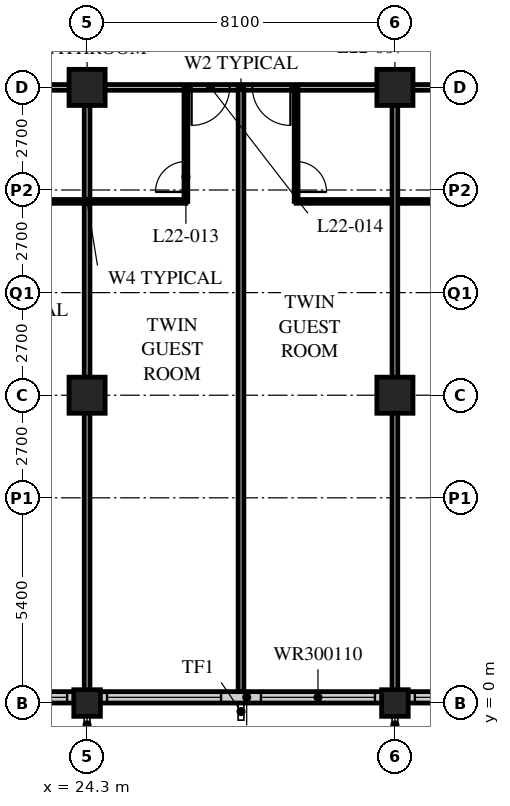
"""IFC4 building model, lengths in metres.
Left out: names, types, materials, properties, quantities, classifications, styles, units other than length and angle.
Written with IfcOpenShell. Run it as: python <this file> out.ifc"""

import sys

from ifc_helpers import new_model, si_unit, direction, frame, frame_2d, origin, origin_2d, place, context, subcontext, project, spatial, rectangle, hollow_rectangle, extrude, element, fill, save


model = new_model("IFC4")
c1 = context("Model", 3, precision=1e-05, world=origin(), true_north=direction((0.0, 1.0)))
c2 = subcontext(c1, "Body", "Model", "MODEL_VIEW")
j1 = project(units=[si_unit("LENGTHUNIT", "METRE"), si_unit("PLANEANGLEUNIT", "RADIAN")], contexts=[c1])
p1 = place(None, origin())
s1 = spatial("IfcSite", under=j1, at=p1, CompositionType="ELEMENT")
p2 = place(p1, origin())
s2 = spatial("IfcBuilding", under=s1, at=p2, CompositionType="ELEMENT")
p3 = place(p2, frame((0.0, 0.0, 87.4)))
s3 = spatial("IfcBuildingStorey", under=s2, at=p3, CompositionType="ELEMENT", Elevation=87.4)
p4 = place(p3, frame((24.3, 0.0, 0.0), z_axis=(0.0, 0.0, 1.0), x_axis=(1.0, 0.0, 0.0)))
e1 = element("IfcColumn", 1, at=p4, inside=s3, PredefinedType="COLUMN", context=c2, shape_type="SweptSolid", body=[
    extrude(hollow_rectangle(XDim=0.7, YDim=0.7, WallThickness=0.06, at=origin_2d()), origin(), (0.0, 0.0, 1.0), 3.4),
])
for number, where, z_axis, x_axis in (
    (2, (24.3, 8.1, 0.0), (0.0, 0.0, 1.0), (1.0, 0.0, 0.0)),
    (3, (24.3, 16.2, 0.0), (0.0, 0.0, 1.0), (1.0, 0.0, 0.0)),
):
    element("IfcColumn", number, at=place(p3, frame(where, z_axis=z_axis, x_axis=x_axis)), inside=s3, PredefinedType="COLUMN", context=c2, shape_type="SweptSolid", body=[
        extrude(hollow_rectangle(XDim=0.95, YDim=0.95, WallThickness=0.095, at=origin_2d()), origin(), (0.0, 0.0, 1.0), 3.4),
    ])
p5 = place(p3, frame((32.4, 0.0, 0.0), z_axis=(0.0, 0.0, 1.0), x_axis=(1.0, 0.0, 0.0)))
e4 = element("IfcColumn", 4, at=p5, inside=s3, PredefinedType="COLUMN", context=c2, shape_type="SweptSolid", body=[
    extrude(hollow_rectangle(XDim=0.7, YDim=0.7, WallThickness=0.06, at=origin_2d()), origin(), (0.0, 0.0, 1.0), 3.4),
])
for number, where, z_axis, x_axis in (
    (5, (32.4, 8.1, 0.0), (0.0, 0.0, 1.0), (1.0, 0.0, 0.0)),
    (6, (32.4, 16.2, 0.0), (0.0, 0.0, 1.0), (1.0, 0.0, 0.0)),
):
    element("IfcColumn", number, at=place(p3, frame(where, z_axis=z_axis, x_axis=x_axis)), inside=s3, PredefinedType="COLUMN", context=c2, shape_type="SweptSolid", body=[
        extrude(hollow_rectangle(XDim=0.95, YDim=0.95, WallThickness=0.095, at=origin_2d()), origin(), (0.0, 0.0, 1.0), 3.4),
    ])
p6 = place(p3, frame((8.4, 0.15, 0.0), z_axis=(0.0, 0.0, 1.0), x_axis=(1.0, 0.0, 0.0)))
e7 = element("IfcWall", 7, at=p6, inside=s3, PredefinedType="SOLIDWALL", context=c2, shape_type="SweptSolid", body=[
    extrude(rectangle(XDim=40.2, YDim=0.3, at=frame_2d((20.1, 0.0))), origin(), (0.0, 0.0, 1.0), 2.05),
])
p7 = place(p6, frame((0.225, 0.0, 0.9)))
e8 = element("IfcOpeningElement", 8, at=p7, cuts=e7, PredefinedType="OPENING", context=c2, shape_type="SweptSolid", body=[
    extrude(rectangle(XDim=3.0, YDim=1.1, at=frame_2d((1.5, 0.55))), frame((0.0, 0.16, 0.0), z_axis=(0.0, -1.0, 0.0), x_axis=(1.0, 0.0, 0.0)), (0.0, 0.0, 1.0), 0.32),
])
p8 = place(p6, frame((4.275, 0.0, 0.9)))
e9 = element("IfcOpeningElement", 9, at=p8, cuts=e7, PredefinedType="OPENING", context=c2, shape_type="SweptSolid", body=[
    extrude(rectangle(XDim=3.0, YDim=1.1, at=frame_2d((1.5, 0.55))), frame((0.0, 0.16, 0.0), z_axis=(0.0, -1.0, 0.0), x_axis=(1.0, 0.0, 0.0)), (0.0, 0.0, 1.0), 0.32),
])
p9 = place(p6, frame((8.325, 0.0, 0.9)))
e10 = element("IfcOpeningElement", 10, at=p9, cuts=e7, PredefinedType="OPENING", context=c2, shape_type="SweptSolid", body=[
    extrude(rectangle(XDim=3.0, YDim=1.1, at=frame_2d((1.5, 0.55))), frame((0.0, 0.16, 0.0), z_axis=(0.0, -1.0, 0.0), x_axis=(1.0, 0.0, 0.0)), (0.0, 0.0, 1.0), 0.32),
])
p10 = place(p6, frame((12.375, 0.0, 0.9)))
e11 = element("IfcOpeningElement", 11, at=p10, cuts=e7, PredefinedType="OPENING", context=c2, shape_type="SweptSolid", body=[
    extrude(rectangle(XDim=3.0, YDim=1.1, at=frame_2d((1.5, 0.55))), frame((0.0, 0.16, 0.0), z_axis=(0.0, -1.0, 0.0), x_axis=(1.0, 0.0, 0.0)), (0.0, 0.0, 1.0), 0.32),
])
p11 = place(p6, frame((16.425, 0.0, 0.9)))
e12 = element("IfcOpeningElement", 12, at=p11, cuts=e7, PredefinedType="OPENING", context=c2, shape_type="SweptSolid", body=[
    extrude(rectangle(XDim=3.0, YDim=1.1, at=frame_2d((1.5, 0.55))), frame((0.0, 0.16, 0.0), z_axis=(0.0, -1.0, 0.0), x_axis=(1.0, 0.0, 0.0)), (0.0, 0.0, 1.0), 0.32),
])
p12 = place(p6, frame((20.475, 0.0, 0.9)))
e13 = element("IfcOpeningElement", 13, at=p12, cuts=e7, PredefinedType="OPENING", context=c2, shape_type="SweptSolid", body=[
    extrude(rectangle(XDim=3.0, YDim=1.1, at=frame_2d((1.5, 0.55))), frame((0.0, 0.16, 0.0), z_axis=(0.0, -1.0, 0.0), x_axis=(1.0, 0.0, 0.0)), (0.0, 0.0, 1.0), 0.32),
])
p13 = place(p6, frame((24.525, 0.0, 0.9)))
e14 = element("IfcOpeningElement", 14, at=p13, cuts=e7, PredefinedType="OPENING", context=c2, shape_type="SweptSolid", body=[
    extrude(rectangle(XDim=3.0, YDim=1.1, at=frame_2d((1.5, 0.55))), frame((0.0, 0.16, 0.0), z_axis=(0.0, -1.0, 0.0), x_axis=(1.0, 0.0, 0.0)), (0.0, 0.0, 1.0), 0.32),
])
p14 = place(p6, frame((28.575, 0.0, 0.9)))
e15 = element("IfcOpeningElement", 15, at=p14, cuts=e7, PredefinedType="OPENING", context=c2, shape_type="SweptSolid", body=[
    extrude(rectangle(XDim=3.0, YDim=1.1, at=frame_2d((1.5, 0.55))), frame((0.0, 0.16, 0.0), z_axis=(0.0, -1.0, 0.0), x_axis=(1.0, 0.0, 0.0)), (0.0, 0.0, 1.0), 0.32),
])
p15 = place(p6, frame((32.625, 0.0, 0.9)))
e16 = element("IfcOpeningElement", 16, at=p15, cuts=e7, PredefinedType="OPENING", context=c2, shape_type="SweptSolid", body=[
    extrude(rectangle(XDim=3.0, YDim=1.1, at=frame_2d((1.5, 0.55))), frame((0.0, 0.16, 0.0), z_axis=(0.0, -1.0, 0.0), x_axis=(1.0, 0.0, 0.0)), (0.0, 0.0, 1.0), 0.32),
])
p16 = place(p6, frame((36.675, 0.0, 0.9)))
e17 = element("IfcOpeningElement", 17, at=p16, cuts=e7, PredefinedType="OPENING", context=c2, shape_type="SweptSolid", body=[
    extrude(rectangle(XDim=3.0, YDim=1.1, at=frame_2d((1.5, 0.55))), frame((0.0, 0.16, 0.0), z_axis=(0.0, -1.0, 0.0), x_axis=(1.0, 0.0, 0.0)), (0.0, 0.0, 1.0), 0.32),
])
p17 = place(p3, frame((12.15, 16.2, 0.0), z_axis=(0.0, 0.0, 1.0), x_axis=(1.0, 0.0, 0.0)))
e18 = element("IfcWall", 18, at=p17, inside=s3, PredefinedType="PARTITIONING", context=c2, shape_type="SweptSolid", body=[
    extrude(rectangle(XDim=32.4, YDim=0.15, at=frame_2d((16.2, 0.0))), origin(), (0.0, 0.0, 1.0), 2.388),
])
p18 = place(p17, frame((6.5, 0.0, 0.0)))
e19 = element("IfcOpeningElement", 19, at=p18, cuts=e18, PredefinedType="OPENING", context=c2, shape_type="SweptSolid", body=[
    extrude(rectangle(XDim=1.0, YDim=2.1, at=frame_2d((0.5, 1.05))), frame((0.0, 0.085, 0.0), z_axis=(0.0, -1.0, 0.0), x_axis=(1.0, 0.0, 0.0)), (0.0, 0.0, 1.0), 0.17),
])
p19 = place(p17, frame((8.4, 0.0, 0.0)))
e20 = element("IfcOpeningElement", 20, at=p19, cuts=e18, PredefinedType="OPENING", context=c2, shape_type="SweptSolid", body=[
    extrude(rectangle(XDim=1.0, YDim=2.1, at=frame_2d((0.5, 1.05))), frame((0.0, 0.085, 0.0), z_axis=(0.0, -1.0, 0.0), x_axis=(1.0, 0.0, 0.0)), (0.0, 0.0, 1.0), 0.17),
])
p20 = place(p17, frame((14.9, 0.0, 0.0)))
e21 = element("IfcOpeningElement", 21, at=p20, cuts=e18, PredefinedType="OPENING", context=c2, shape_type="SweptSolid", body=[
    extrude(rectangle(XDim=1.0, YDim=2.1, at=frame_2d((0.5, 1.05))), frame((0.0, 0.085, 0.0), z_axis=(0.0, -1.0, 0.0), x_axis=(1.0, 0.0, 0.0)), (0.0, 0.0, 1.0), 0.17),
])
p21 = place(p17, frame((16.5, 0.0, 0.0)))
e22 = element("IfcOpeningElement", 22, at=p21, cuts=e18, PredefinedType="OPENING", context=c2, shape_type="SweptSolid", body=[
    extrude(rectangle(XDim=1.0, YDim=2.1, at=frame_2d((0.5, 1.05))), frame((0.0, 0.085, 0.0), z_axis=(0.0, -1.0, 0.0), x_axis=(1.0, 0.0, 0.0)), (0.0, 0.0, 1.0), 0.17),
])
p22 = place(p17, frame((23.0, 0.0, 0.0)))
e23 = element("IfcOpeningElement", 23, at=p22, cuts=e18, PredefinedType="OPENING", context=c2, shape_type="SweptSolid", body=[
    extrude(rectangle(XDim=1.0, YDim=2.1, at=frame_2d((0.5, 1.05))), frame((0.0, 0.085, 0.0), z_axis=(0.0, -1.0, 0.0), x_axis=(1.0, 0.0, 0.0)), (0.0, 0.0, 1.0), 0.17),
])
p23 = place(p17, frame((24.9, 0.0, 0.0)))
e24 = element("IfcOpeningElement", 24, at=p23, cuts=e18, PredefinedType="OPENING", context=c2, shape_type="SweptSolid", body=[
    extrude(rectangle(XDim=1.0, YDim=2.1, at=frame_2d((0.5, 1.05))), frame((0.0, 0.085, 0.0), z_axis=(0.0, -1.0, 0.0), x_axis=(1.0, 0.0, 0.0)), (0.0, 0.0, 1.0), 0.17),
])
p24 = place(p17, frame((1.525, 0.0, 0.0)))
e25 = element("IfcOpeningElement", 25, at=p24, cuts=e18, PredefinedType="OPENING", context=c2, shape_type="SweptSolid", body=[
    extrude(rectangle(XDim=1.0, YDim=2.1, at=frame_2d((0.5, 1.05))), frame((0.0, 0.085, 0.0), z_axis=(0.0, -1.0, 0.0), x_axis=(1.0, 0.0, 0.0)), (0.0, 0.0, 1.0), 0.17),
])
p25 = place(p17, frame((29.875, 0.0, 0.0)))
e26 = element("IfcOpeningElement", 26, at=p25, cuts=e18, PredefinedType="OPENING", context=c2, shape_type="SweptSolid", body=[
    extrude(rectangle(XDim=1.0, YDim=2.1, at=frame_2d((0.5, 1.05))), frame((0.0, 0.085, 0.0), z_axis=(0.0, -1.0, 0.0), x_axis=(1.0, 0.0, 0.0)), (0.0, 0.0, 1.0), 0.17),
])
p26 = place(p3, frame((21.7, 13.2, 0.0), z_axis=(0.0, 0.0, 1.0), x_axis=(1.0, 0.0, 0.0)))
e27 = element("IfcWall", 27, at=p26, inside=s3, PredefinedType="PARTITIONING", context=c2, shape_type="SweptSolid", body=[
    extrude(rectangle(XDim=5.2, YDim=0.1, at=frame_2d((2.6, 0.0))), origin(), (0.0, 0.0, 1.0), 3.15),
])
p27 = place(p3, frame((24.3, 16.2, 0.0), z_axis=(0.0, 0.0, 1.0), x_axis=(0.0, -1.0, 0.0)))
e28 = element("IfcWall", 28, at=p27, inside=s3, PredefinedType="PARTITIONING", context=c2, shape_type="SweptSolid", body=[
    extrude(rectangle(XDim=15.9, YDim=0.15, at=frame_2d((7.95, 0.0))), origin(), (0.0, 0.0, 1.0), 2.05),
])
p28 = place(p3, frame((26.9, 16.2, 0.0), z_axis=(0.0, 0.0, 1.0), x_axis=(0.0, -1.0, 0.0)))
e29 = element("IfcWall", 29, at=p28, inside=s3, PredefinedType="PARTITIONING", context=c2, shape_type="SweptSolid", body=[
    extrude(rectangle(XDim=3.0, YDim=0.1, at=frame_2d((1.5, 0.0))), origin(), (0.0, 0.0, 1.0), 3.15),
])
p29 = place(p28, frame((1.95, 0.0, 0.0)))
e30 = element("IfcOpeningElement", 30, at=p29, cuts=e29, PredefinedType="OPENING", context=c2, shape_type="SweptSolid", body=[
    extrude(rectangle(XDim=0.8, YDim=2.1, at=frame_2d((0.4, 1.05))), frame((0.0, 0.06, 0.0), z_axis=(0.0, -1.0, 0.0), x_axis=(1.0, 0.0, 0.0)), (0.0, 0.0, 1.0), 0.12),
])
p30 = place(p3, frame((28.35, 16.2, 0.0), z_axis=(0.0, 0.0, 1.0), x_axis=(0.0, -1.0, 0.0)))
e31 = element("IfcWall", 31, at=p30, inside=s3, PredefinedType="PARTITIONING", context=c2, shape_type="SweptSolid", body=[
    extrude(rectangle(XDim=15.9, YDim=0.15, at=frame_2d((7.95, 0.0))), origin(), (0.0, 0.0, 1.0), 3.15),
])
p31 = place(p3, frame((29.8, 13.2, 0.0), z_axis=(0.0, 0.0, 1.0), x_axis=(1.0, 0.0, 0.0)))
e32 = element("IfcWall", 32, at=p31, inside=s3, PredefinedType="PARTITIONING", context=c2, shape_type="SweptSolid", body=[
    extrude(rectangle(XDim=5.2, YDim=0.1, at=frame_2d((2.6, 0.0))), origin(), (0.0, 0.0, 1.0), 3.15),
])
p32 = place(p3, frame((29.8, 16.2, 0.0), z_axis=(0.0, 0.0, 1.0), x_axis=(0.0, -1.0, 0.0)))
e33 = element("IfcWall", 33, at=p32, inside=s3, PredefinedType="PARTITIONING", context=c2, shape_type="SweptSolid", body=[
    extrude(rectangle(XDim=3.0, YDim=0.1, at=frame_2d((1.5, 0.0))), origin(), (0.0, 0.0, 1.0), 3.15),
])
p33 = place(p32, frame((1.95, 0.0, 0.0)))
e34 = element("IfcOpeningElement", 34, at=p33, cuts=e33, PredefinedType="OPENING", context=c2, shape_type="SweptSolid", body=[
    extrude(rectangle(XDim=0.8, YDim=2.1, at=frame_2d((0.4, 1.05))), frame((0.0, 0.06, 0.0), z_axis=(0.0, -1.0, 0.0), x_axis=(1.0, 0.0, 0.0)), (0.0, 0.0, 1.0), 0.12),
])
p34 = place(p3, frame((32.4, 16.2, 0.0), z_axis=(0.0, 0.0, 1.0), x_axis=(0.0, -1.0, 0.0)))
e35 = element("IfcWall", 35, at=p34, inside=s3, PredefinedType="PARTITIONING", context=c2, shape_type="SweptSolid", body=[
    extrude(rectangle(XDim=15.9, YDim=0.15, at=frame_2d((7.95, 0.0))), origin(), (0.0, 0.0, 1.0), 2.05),
])
p35 = place(p10, origin())
e36 = element("IfcWindow", 36, at=p35, inside=s3, PartitioningType="SINGLE_PANEL", PredefinedType="WINDOW", context=c2, shape_type="SweptSolid", body=[
    extrude(rectangle(XDim=3.0, YDim=1.1, at=frame_2d((1.5, 0.55))), frame((0.0, 0.03, 0.0), z_axis=(0.0, -1.0, 0.0), x_axis=(1.0, 0.0, 0.0)), (0.0, 0.0, 1.0), 0.06),
])
fill(e11, e36)
p36 = place(p11, origin())
e37 = element("IfcWindow", 37, at=p36, inside=s3, PartitioningType="SINGLE_PANEL", PredefinedType="WINDOW", context=c2, shape_type="SweptSolid", body=[
    extrude(rectangle(XDim=3.0, YDim=1.1, at=frame_2d((1.5, 0.55))), frame((0.0, 0.03, 0.0), z_axis=(0.0, -1.0, 0.0), x_axis=(1.0, 0.0, 0.0)), (0.0, 0.0, 1.0), 0.06),
])
fill(e12, e37)
p37 = place(p12, origin())
e38 = element("IfcWindow", 38, at=p37, inside=s3, PartitioningType="SINGLE_PANEL", PredefinedType="WINDOW", context=c2, shape_type="SweptSolid", body=[
    extrude(rectangle(XDim=3.0, YDim=1.1, at=frame_2d((1.5, 0.55))), frame((0.0, 0.03, 0.0), z_axis=(0.0, -1.0, 0.0), x_axis=(1.0, 0.0, 0.0)), (0.0, 0.0, 1.0), 0.06),
])
fill(e13, e38)
p38 = place(p13, origin())
e39 = element("IfcWindow", 39, at=p38, inside=s3, PartitioningType="SINGLE_PANEL", PredefinedType="WINDOW", context=c2, shape_type="SweptSolid", body=[
    extrude(rectangle(XDim=3.0, YDim=1.1, at=frame_2d((1.5, 0.55))), frame((0.0, 0.03, 0.0), z_axis=(0.0, -1.0, 0.0), x_axis=(1.0, 0.0, 0.0)), (0.0, 0.0, 1.0), 0.06),
])
fill(e14, e39)
p39 = place(p29, origin())
e40 = element("IfcDoor", 40, at=p39, inside=s3, OperationType="SINGLE_SWING_LEFT", PredefinedType="DOOR", context=c2, shape_type="SweptSolid", body=[
    extrude(rectangle(XDim=0.8, YDim=2.1, at=frame_2d((0.4, 1.05))), frame((0.0, 0.025, 0.0), z_axis=(0.0, -1.0, 0.0), x_axis=(1.0, 0.0, 0.0)), (0.0, 0.0, 1.0), 0.05),
])
fill(e30, e40)
p40 = place(p20, origin())
e41 = element("IfcDoor", 41, at=p40, inside=s3, OperationType="SINGLE_SWING_RIGHT", PredefinedType="DOOR", context=c2, shape_type="SweptSolid", body=[
    extrude(rectangle(XDim=1.0, YDim=2.1, at=frame_2d((0.5, 1.05))), frame((0.0, 0.025, 0.0), z_axis=(0.0, -1.0, 0.0), x_axis=(1.0, 0.0, 0.0)), (0.0, 0.0, 1.0), 0.05),
])
fill(e21, e41)
p41 = place(p33, origin())
e42 = element("IfcDoor", 42, at=p41, inside=s3, OperationType="SINGLE_SWING_RIGHT", PredefinedType="DOOR", context=c2, shape_type="SweptSolid", body=[
    extrude(rectangle(XDim=0.8, YDim=2.1, at=frame_2d((0.4, 1.05))), frame((0.0, 0.025, 0.0), z_axis=(0.0, -1.0, 0.0), x_axis=(1.0, 0.0, 0.0)), (0.0, 0.0, 1.0), 0.05),
])
fill(e34, e42)
p42 = place(p21, origin())
e43 = element("IfcDoor", 43, at=p42, inside=s3, OperationType="SINGLE_SWING_LEFT", PredefinedType="DOOR", context=c2, shape_type="SweptSolid", body=[
    extrude(rectangle(XDim=1.0, YDim=2.1, at=frame_2d((0.5, 1.05))), frame((0.0, 0.025, 0.0), z_axis=(0.0, -1.0, 0.0), x_axis=(1.0, 0.0, 0.0)), (0.0, 0.0, 1.0), 0.05),
])
fill(e22, e43)
save(model, sys.argv[1])
